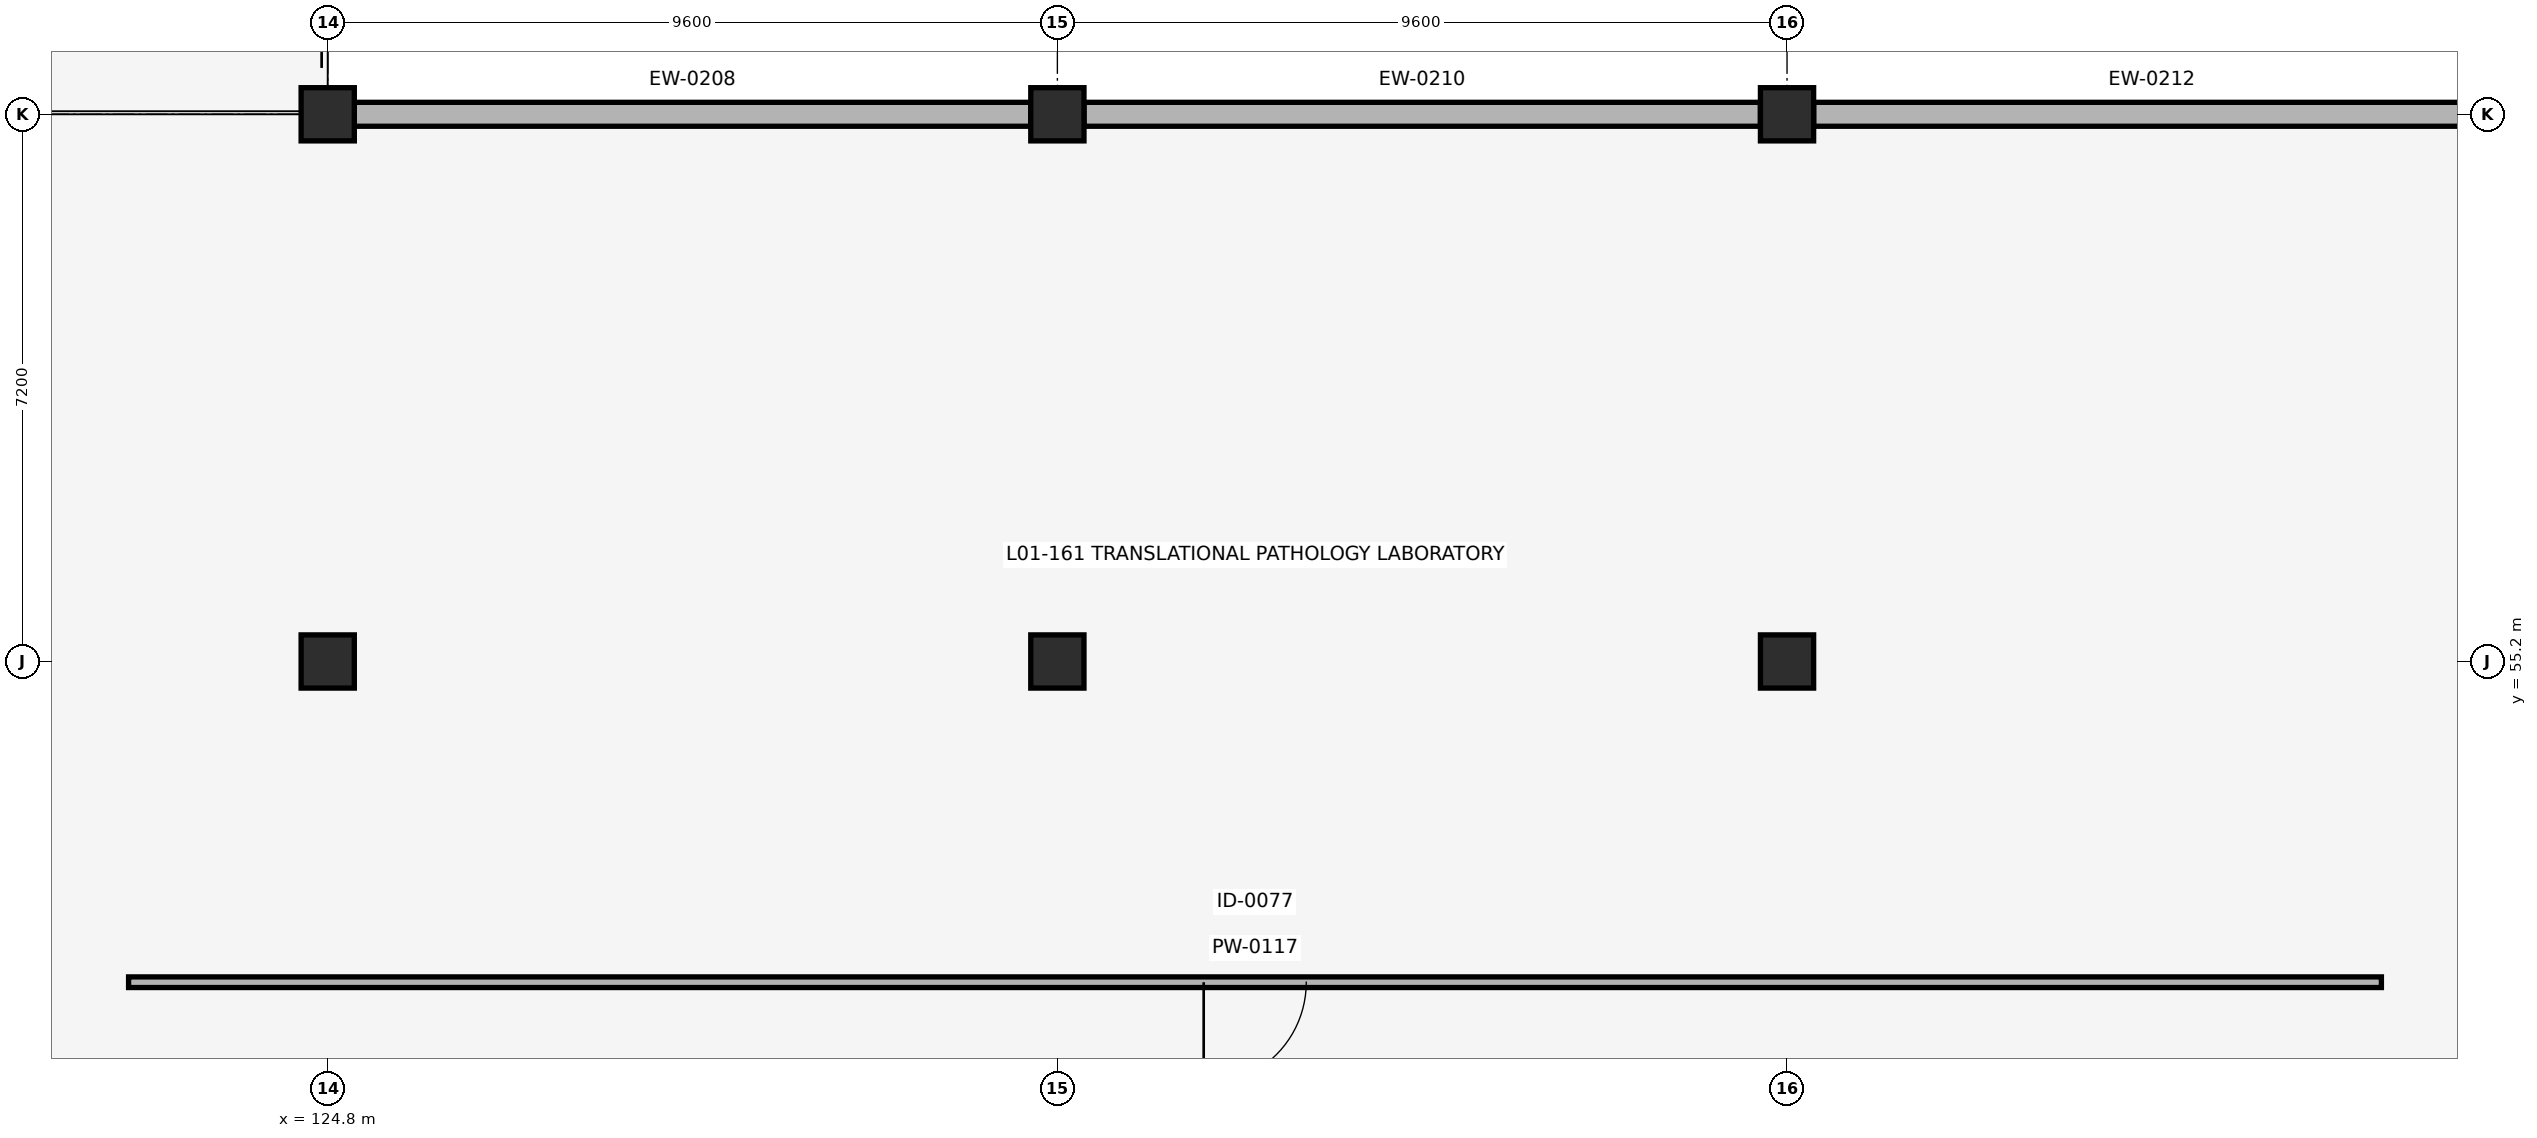
"""IFC4 building model, lengths in metres.
Left out: names, types, materials, properties, quantities, classifications, styles, units other than length and angle.
Written with IfcOpenShell. Run it as: python <this file> out.ifc"""

import sys

from ifc_helpers import new_model, si_unit, direction, frame, frame_2d, origin, origin_2d, place, context, subcontext, project, spatial, rectangle, extrude, element, fill, save


model = new_model("IFC4")
c1 = context("Model", 3, precision=1e-05, world=origin(), true_north=direction((0.0, 1.0)))
c2 = subcontext(c1, "Body", "Model", "MODEL_VIEW")
j1 = project(units=[si_unit("LENGTHUNIT", "METRE"), si_unit("PLANEANGLEUNIT", "RADIAN")], contexts=[c1])
p1 = place(None, origin())
s1 = spatial("IfcSite", under=j1, at=p1, CompositionType="ELEMENT")
p2 = place(p1, origin())
s2 = spatial("IfcBuilding", under=s1, at=p2, CompositionType="ELEMENT")
p3 = place(p2, frame((0.0, 0.0, 4.42)))
s3 = spatial("IfcBuildingStorey", under=s2, at=p3, CompositionType="ELEMENT", Elevation=4.42)
for number, where, z_axis, x_axis in (
    (1, (124.8, 55.2, 0.0), (0.0, 0.0, 1.0), (1.0, 0.0, 0.0)),
    (2, (124.8, 62.4, 0.0), (0.0, 0.0, 1.0), (1.0, 0.0, 0.0)),
    (3, (134.4, 55.2, 0.0), (0.0, 0.0, 1.0), (1.0, 0.0, 0.0)),
    (4, (134.4, 62.4, 0.0), (0.0, 0.0, 1.0), (1.0, 0.0, 0.0)),
    (5, (144.0, 55.2, 0.0), (0.0, 0.0, 1.0), (1.0, 0.0, 0.0)),
    (6, (144.0, 62.4, 0.0), (0.0, 0.0, 1.0), (1.0, 0.0, 0.0)),
):
    element("IfcColumn", number, at=place(p3, frame(where, z_axis=z_axis, x_axis=x_axis)), inside=s3, PredefinedType="COLUMN", context=c2, shape_type="SweptSolid", body=[
        extrude(rectangle(XDim=0.7, YDim=0.7, at=origin_2d()), origin(), (0.0, 0.0, 1.0), 4.08),
    ])
p4 = place(p3, frame((134.05, 62.4, 0.0), z_axis=(0.0, 0.0, 1.0), x_axis=(-1.0, 0.0, 0.0)))
e7 = element("IfcWall", 7, at=p4, inside=s3, PredefinedType="SOLIDWALL", context=c2, shape_type="SweptSolid", body=[
    extrude(rectangle(XDim=8.9, YDim=0.315, at=frame_2d((4.45, 0.0))), origin(), (0.0, 0.0, 1.0), 3.05),
])
for number, where, z_axis, x_axis in (
    (8, (143.65, 62.4, 0.0), (0.0, 0.0, 1.0), (-1.0, 0.0, 0.0)),
    (9, (153.25, 62.4, 0.0), (0.0, 0.0, 1.0), (-1.0, 0.0, 0.0)),
):
    element("IfcWall", number, at=place(p3, frame(where, z_axis=z_axis, x_axis=x_axis)), inside=s3, PredefinedType="SOLIDWALL", context=c2, shape_type="SweptSolid", body=[
        extrude(rectangle(XDim=8.9, YDim=0.315, at=frame_2d((4.45, 0.0))), origin(), (0.0, 0.0, 1.0), 3.05),
    ])
p5 = place(p3, frame((122.18, 50.98, 0.0), z_axis=(0.0, 0.0, 1.0), x_axis=(1.0, 0.0, 0.0)))
e10 = element("IfcWall", 10, at=p5, inside=s3, PredefinedType="PARTITIONING", context=c2, shape_type="SweptSolid", body=[
    extrude(rectangle(XDim=29.64, YDim=0.14, at=frame_2d((14.82, 0.0))), origin(), (0.0, 0.0, 1.0), 3.12),
])
p6 = place(p5, frame((14.145, 0.0, 0.0)))
e11 = element("IfcOpeningElement", 11, at=p6, cuts=e10, PredefinedType="OPENING", context=c2, shape_type="SweptSolid", body=[
    extrude(rectangle(XDim=1.35, YDim=2.12, at=frame_2d((0.675, 1.06))), frame((0.0, 0.08, 0.0), z_axis=(0.0, -1.0, 0.0), x_axis=(1.0, 0.0, 0.0)), (0.0, 0.0, 1.0), 0.16),
])
p7 = place(p6, origin())
e12 = element("IfcDoor", 12, at=p7, inside=s3, OperationType="SINGLE_SWING_RIGHT", PredefinedType="DOOR", context=c2, shape_type="SweptSolid", body=[
    extrude(rectangle(XDim=1.35, YDim=2.12, at=frame_2d((0.675, 1.06))), frame((0.0, 0.025, 0.0), z_axis=(0.0, -1.0, 0.0), x_axis=(1.0, 0.0, 0.0)), (0.0, 0.0, 1.0), 0.05),
])
fill(e11, e12)
save(model, sys.argv[1])
